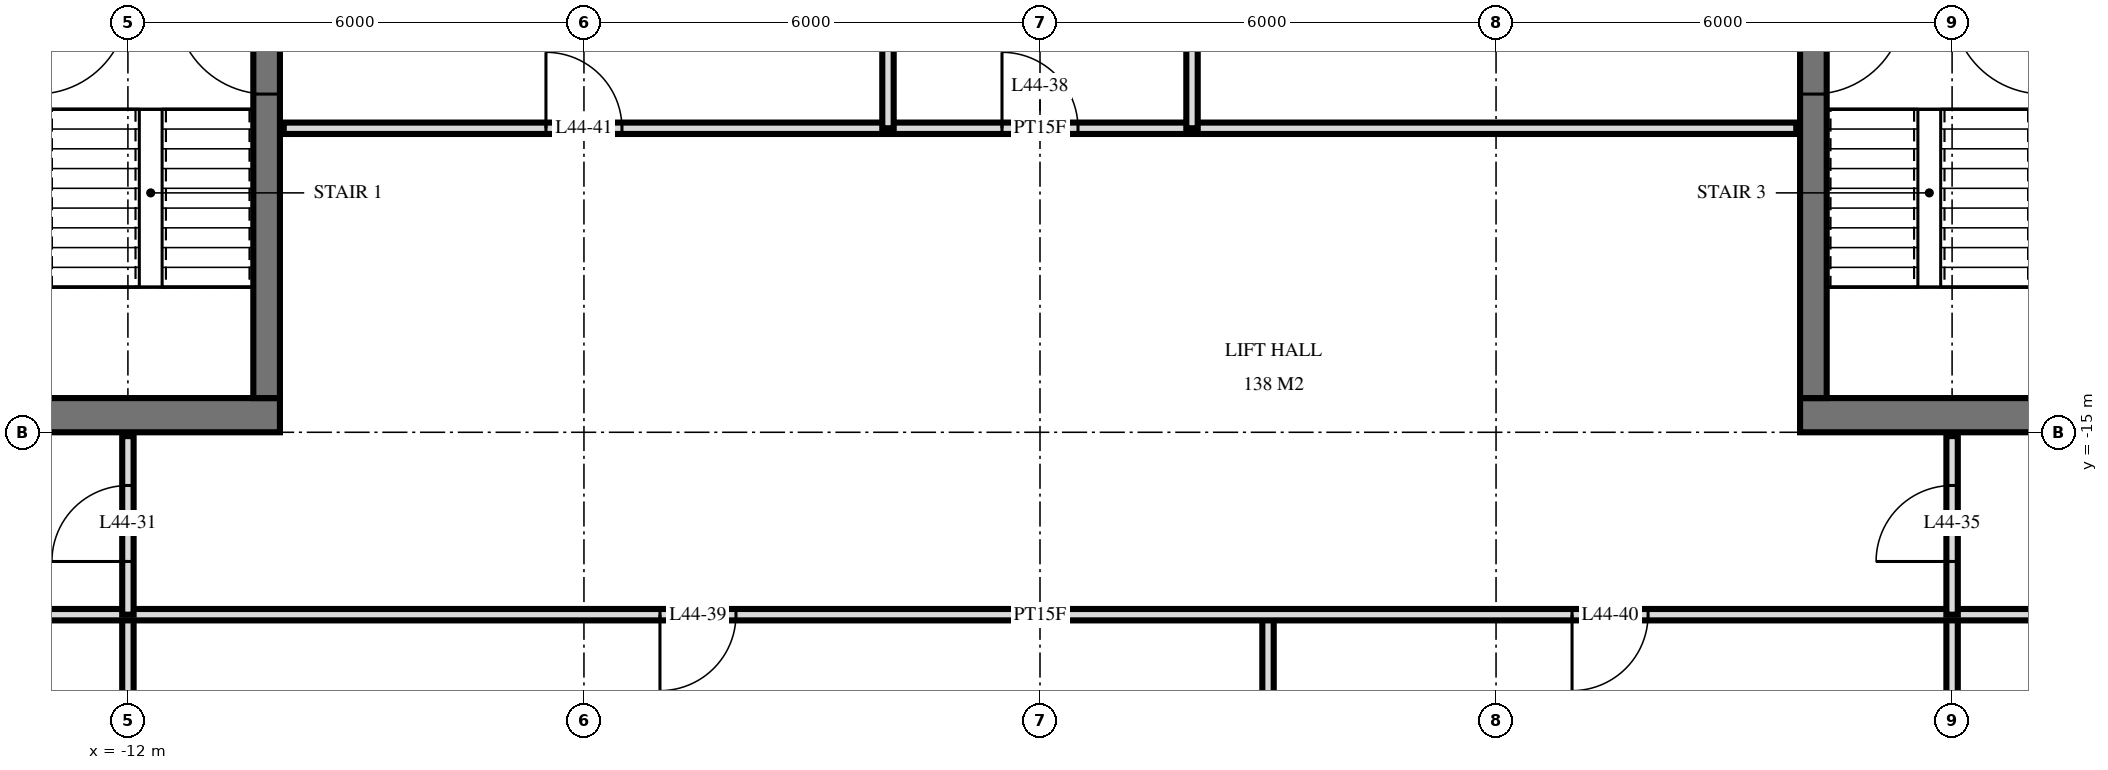
"""IFC4 building model, lengths in metres.
Left out: names, types, materials, properties, quantities, classifications, styles, units other than length and angle.
Written with IfcOpenShell. Run it as: python <this file> out.ifc"""

import sys

from ifc_helpers import new_model, si_unit, direction, frame, frame_2d, origin, place, context, subcontext, project, spatial, rectangle, extrude, element, fill, save


model = new_model("IFC4")
c1 = context("Model", 3, precision=1e-05, world=origin(), true_north=direction((0.0, 1.0)))
c2 = subcontext(c1, "Body", "Model", "MODEL_VIEW")
j1 = project(units=[si_unit("LENGTHUNIT", "METRE"), si_unit("PLANEANGLEUNIT", "RADIAN")], contexts=[c1])
p1 = place(None, origin())
s1 = spatial("IfcSite", under=j1, at=p1, CompositionType="ELEMENT")
p2 = place(p1, origin())
s2 = spatial("IfcBuilding", under=s1, at=p2, CompositionType="ELEMENT")
p3 = place(p2, frame((0.0, 0.0, 170.4)))
s3 = spatial("IfcBuildingStorey", under=s2, at=p3, CompositionType="ELEMENT", Elevation=170.4)
p4 = place(p3, frame((-24.5, -14.775, 0.0), z_axis=(0.0, 0.0, 1.0), x_axis=(1.0, 0.0, 0.0)))
e1 = element("IfcWall", 1, at=p4, inside=s3, PredefinedType="SHEAR", context=c2, shape_type="SweptSolid", body=[
    extrude(rectangle(XDim=14.5, YDim=0.45, at=frame_2d((7.25, 0.0))), origin(), (0.0, 0.0, 1.0), 3.6),
])
p5 = place(p4, frame((6.2, 0.0, 0.0)))
e2 = element("IfcOpeningElement", 2, at=p5, cuts=e1, PredefinedType="OPENING", context=c2, shape_type="SweptSolid", body=[
    extrude(rectangle(XDim=1.2, YDim=2.1, at=frame_2d((0.6, 1.05))), frame((0.0, 0.235, 0.0), z_axis=(0.0, -1.0, 0.0), x_axis=(1.0, 0.0, 0.0)), (0.0, 0.0, 1.0), 0.47),
])
p6 = place(p4, frame((9.25, 0.0, 0.0)))
e3 = element("IfcOpeningElement", 3, at=p6, cuts=e1, PredefinedType="OPENING", context=c2, shape_type="SweptSolid", body=[
    extrude(rectangle(XDim=1.1, YDim=2.1, at=frame_2d((0.55, 1.05))), frame((0.0, 0.235, 0.0), z_axis=(0.0, -1.0, 0.0), x_axis=(1.0, 0.0, 0.0)), (0.0, 0.0, 1.0), 0.47),
])
p7 = place(p4, frame((3.5, 0.0, 0.0)))
e4 = element("IfcOpeningElement", 4, at=p7, cuts=e1, PredefinedType="OPENING", context=c2, shape_type="SweptSolid", body=[
    extrude(rectangle(XDim=0.9, YDim=2.1, at=frame_2d((0.45, 1.05))), frame((0.0, 0.235, 0.0), z_axis=(0.0, -1.0, 0.0), x_axis=(1.0, 0.0, 0.0)), (0.0, 0.0, 1.0), 0.47),
])
p8 = place(p4, frame((1.05, 0.0, 0.0)))
e5 = element("IfcOpeningElement", 5, at=p8, cuts=e1, PredefinedType="OPENING", context=c2, shape_type="SweptSolid", body=[
    extrude(rectangle(XDim=1.0, YDim=2.1, at=frame_2d((0.5, 1.05))), frame((0.0, 0.235, 0.0), z_axis=(0.0, -1.0, 0.0), x_axis=(1.0, 0.0, 0.0)), (0.0, 0.0, 1.0), 0.47),
])
p9 = place(p3, frame((-10.175, -14.55, 0.0), z_axis=(0.0, 0.0, 1.0), x_axis=(0.0, 1.0, 0.0)))
e6 = element("IfcWall", 6, at=p9, inside=s3, PredefinedType="SHEAR", context=c2, shape_type="SweptSolid", body=[
    extrude(rectangle(XDim=14.1, YDim=0.35, at=frame_2d((7.05, 0.0))), origin(), (0.0, 0.0, 1.0), 3.6),
])
p10 = place(p9, frame((8.4, 0.0, 0.0)))
e7 = element("IfcOpeningElement", 7, at=p10, cuts=e6, PredefinedType="OPENING", context=c2, shape_type="SweptSolid", body=[
    extrude(rectangle(XDim=1.4, YDim=2.4, at=frame_2d((0.7, 1.2))), frame((0.0, 0.185, 0.0), z_axis=(0.0, -1.0, 0.0), x_axis=(1.0, 0.0, 0.0)), (0.0, 0.0, 1.0), 0.37),
])
p11 = place(p9, frame((10.0, 0.0, 0.0)))
e8 = element("IfcOpeningElement", 8, at=p11, cuts=e6, PredefinedType="OPENING", context=c2, shape_type="SweptSolid", body=[
    extrude(rectangle(XDim=1.4, YDim=2.4, at=frame_2d((0.7, 1.2))), frame((0.0, 0.185, 0.0), z_axis=(0.0, -1.0, 0.0), x_axis=(1.0, 0.0, 0.0)), (0.0, 0.0, 1.0), 0.37),
])
p12 = place(p9, frame((4.0, 0.0, 0.0)))
e9 = element("IfcOpeningElement", 9, at=p12, cuts=e6, PredefinedType="OPENING", context=c2, shape_type="SweptSolid", body=[
    extrude(rectangle(XDim=1.2, YDim=2.1, at=frame_2d((0.6, 1.05))), frame((0.0, 0.185, 0.0), z_axis=(0.0, -1.0, 0.0), x_axis=(1.0, 0.0, 0.0)), (0.0, 0.0, 1.0), 0.37),
])
p13 = place(p3, frame((10.0, -14.775, 0.0), z_axis=(0.0, 0.0, 1.0), x_axis=(1.0, 0.0, 0.0)))
e10 = element("IfcWall", 10, at=p13, inside=s3, PredefinedType="SHEAR", context=c2, shape_type="SweptSolid", body=[
    extrude(rectangle(XDim=14.5, YDim=0.45, at=frame_2d((7.25, 0.0))), origin(), (0.0, 0.0, 1.0), 3.6),
])
p14 = place(p13, frame((7.1, 0.0, 0.0)))
e11 = element("IfcOpeningElement", 11, at=p14, cuts=e10, PredefinedType="OPENING", context=c2, shape_type="SweptSolid", body=[
    extrude(rectangle(XDim=1.2, YDim=2.1, at=frame_2d((0.6, 1.05))), frame((0.0, 0.235, 0.0), z_axis=(0.0, -1.0, 0.0), x_axis=(1.0, 0.0, 0.0)), (0.0, 0.0, 1.0), 0.47),
])
p15 = place(p13, frame((4.15, 0.0, 0.0)))
e12 = element("IfcOpeningElement", 12, at=p15, cuts=e10, PredefinedType="OPENING", context=c2, shape_type="SweptSolid", body=[
    extrude(rectangle(XDim=1.1, YDim=2.1, at=frame_2d((0.55, 1.05))), frame((0.0, 0.235, 0.0), z_axis=(0.0, -1.0, 0.0), x_axis=(1.0, 0.0, 0.0)), (0.0, 0.0, 1.0), 0.47),
])
p16 = place(p13, frame((10.1, 0.0, 0.0)))
e13 = element("IfcOpeningElement", 13, at=p16, cuts=e10, PredefinedType="OPENING", context=c2, shape_type="SweptSolid", body=[
    extrude(rectangle(XDim=0.9, YDim=2.1, at=frame_2d((0.45, 1.05))), frame((0.0, 0.235, 0.0), z_axis=(0.0, -1.0, 0.0), x_axis=(1.0, 0.0, 0.0)), (0.0, 0.0, 1.0), 0.47),
])
p17 = place(p13, frame((12.45, 0.0, 0.0)))
e14 = element("IfcOpeningElement", 14, at=p17, cuts=e10, PredefinedType="OPENING", context=c2, shape_type="SweptSolid", body=[
    extrude(rectangle(XDim=1.0, YDim=2.1, at=frame_2d((0.5, 1.05))), frame((0.0, 0.235, 0.0), z_axis=(0.0, -1.0, 0.0), x_axis=(1.0, 0.0, 0.0)), (0.0, 0.0, 1.0), 0.47),
])
p18 = place(p3, frame((10.175, -14.55, 0.0), z_axis=(0.0, 0.0, 1.0), x_axis=(0.0, 1.0, 0.0)))
e15 = element("IfcWall", 15, at=p18, inside=s3, PredefinedType="SHEAR", context=c2, shape_type="SweptSolid", body=[
    extrude(rectangle(XDim=14.1, YDim=0.35, at=frame_2d((7.05, 0.0))), origin(), (0.0, 0.0, 1.0), 3.6),
])
p19 = place(p18, frame((8.4, 0.0, 0.0)))
e16 = element("IfcOpeningElement", 16, at=p19, cuts=e15, PredefinedType="OPENING", context=c2, shape_type="SweptSolid", body=[
    extrude(rectangle(XDim=1.4, YDim=2.4, at=frame_2d((0.7, 1.2))), frame((0.0, 0.185, 0.0), z_axis=(0.0, -1.0, 0.0), x_axis=(1.0, 0.0, 0.0)), (0.0, 0.0, 1.0), 0.37),
])
p20 = place(p18, frame((10.0, 0.0, 0.0)))
e17 = element("IfcOpeningElement", 17, at=p20, cuts=e15, PredefinedType="OPENING", context=c2, shape_type="SweptSolid", body=[
    extrude(rectangle(XDim=1.4, YDim=2.4, at=frame_2d((0.7, 1.2))), frame((0.0, 0.185, 0.0), z_axis=(0.0, -1.0, 0.0), x_axis=(1.0, 0.0, 0.0)), (0.0, 0.0, 1.0), 0.37),
])
p21 = place(p18, frame((4.0, 0.0, 0.0)))
e18 = element("IfcOpeningElement", 18, at=p21, cuts=e15, PredefinedType="OPENING", context=c2, shape_type="SweptSolid", body=[
    extrude(rectangle(XDim=1.2, YDim=2.1, at=frame_2d((0.6, 1.05))), frame((0.0, 0.185, 0.0), z_axis=(0.0, -1.0, 0.0), x_axis=(1.0, 0.0, 0.0)), (0.0, 0.0, 1.0), 0.37),
])
p22 = place(p3, frame((12.0, -17.4, 0.0), z_axis=(0.0, 0.0, 1.0), x_axis=(0.0, 1.0, 0.0)))
e19 = element("IfcWall", 19, at=p22, inside=s3, PredefinedType="PARTITIONING", context=c2, shape_type="SweptSolid", body=[
    extrude(rectangle(XDim=2.35, YDim=0.15, at=frame_2d((1.175, 0.0))), origin(), (0.0, 0.0, 1.0), 3.32),
])
p23 = place(p22, frame((0.7, 0.0, 0.0)))
e20 = element("IfcOpeningElement", 20, at=p23, cuts=e19, PredefinedType="OPENING", context=c2, shape_type="SweptSolid", body=[
    extrude(rectangle(XDim=1.0, YDim=2.1, at=frame_2d((0.5, 1.05))), frame((0.0, 0.085, 0.0), z_axis=(0.0, -1.0, 0.0), x_axis=(1.0, 0.0, 0.0)), (0.0, 0.0, 1.0), 0.17),
])
for number, where, z_axis, x_axis in (
    (21, (12.0, -33.62, 0.0), (0.0, 0.0, 1.0), (0.0, 1.0, 0.0)),
    (22, (3.0, -33.62, 0.0), (0.0, 0.0, 1.0), (0.0, 1.0, 0.0)),
):
    element("IfcWall", number, at=place(p3, frame(where, z_axis=z_axis, x_axis=x_axis)), inside=s3, PredefinedType="PARTITIONING", context=c2, shape_type="SweptSolid", body=[
        extrude(rectangle(XDim=16.22, YDim=0.15, at=frame_2d((8.11, 0.0))), origin(), (0.0, 0.0, 1.0), 3.32),
    ])
for number, where, z_axis, x_axis in (
    (23, (2.0, -11.0, 0.0), (0.0, 0.0, 1.0), (0.0, 1.0, 0.0)),
    (24, (-2.0, -11.0, 0.0), (0.0, 0.0, 1.0), (0.0, 1.0, 0.0)),
):
    element("IfcWall", number, at=place(p3, frame(where, z_axis=z_axis, x_axis=x_axis)), inside=s3, PredefinedType="PARTITIONING", context=c2, shape_type="SweptSolid", body=[
        extrude(rectangle(XDim=4.0, YDim=0.15, at=frame_2d((2.0, 0.0))), origin(), (0.0, 0.0, 1.0), 3.32),
    ])
p24 = place(p3, frame((-12.0, -17.4, 0.0), z_axis=(0.0, 0.0, 1.0), x_axis=(0.0, 1.0, 0.0)))
e25 = element("IfcWall", 25, at=p24, inside=s3, PredefinedType="PARTITIONING", context=c2, shape_type="SweptSolid", body=[
    extrude(rectangle(XDim=2.35, YDim=0.15, at=frame_2d((1.175, 0.0))), origin(), (0.0, 0.0, 1.0), 3.32),
])
p25 = place(p24, frame((0.7, 0.0, 0.0)))
e26 = element("IfcOpeningElement", 26, at=p25, cuts=e25, PredefinedType="OPENING", context=c2, shape_type="SweptSolid", body=[
    extrude(rectangle(XDim=1.0, YDim=2.1, at=frame_2d((0.5, 1.05))), frame((0.0, 0.085, 0.0), z_axis=(0.0, -1.0, 0.0), x_axis=(1.0, 0.0, 0.0)), (0.0, 0.0, 1.0), 0.17),
])
p26 = place(p3, frame((-12.0, -33.62, 0.0), z_axis=(0.0, 0.0, 1.0), x_axis=(0.0, 1.0, 0.0)))
e27 = element("IfcWall", 27, at=p26, inside=s3, PredefinedType="PARTITIONING", context=c2, shape_type="SweptSolid", body=[
    extrude(rectangle(XDim=16.22, YDim=0.15, at=frame_2d((8.11, 0.0))), origin(), (0.0, 0.0, 1.0), 3.32),
])
p27 = place(p3, frame((-28.02, -17.4, 0.0), z_axis=(0.0, 0.0, 1.0), x_axis=(1.0, 0.0, 0.0)))
e28 = element("IfcWall", 28, at=p27, inside=s3, PredefinedType="PARTITIONING", context=c2, shape_type="SweptSolid", body=[
    extrude(rectangle(XDim=56.04, YDim=0.15, at=frame_2d((28.02, 0.0))), origin(), (0.0, 0.0, 1.0), 3.32),
])
p28 = place(p27, frame((10.42, 0.0, 0.0)))
e29 = element("IfcOpeningElement", 29, at=p28, cuts=e28, PredefinedType="OPENING", context=c2, shape_type="SweptSolid", body=[
    extrude(rectangle(XDim=1.0, YDim=2.1, at=frame_2d((0.5, 1.05))), frame((0.0, 0.085, 0.0), z_axis=(0.0, -1.0, 0.0), x_axis=(1.0, 0.0, 0.0)), (0.0, 0.0, 1.0), 0.17),
])
p29 = place(p27, frame((2.32, 0.0, 0.0)))
e30 = element("IfcOpeningElement", 30, at=p29, cuts=e28, PredefinedType="OPENING", context=c2, shape_type="SweptSolid", body=[
    extrude(rectangle(XDim=1.0, YDim=2.1, at=frame_2d((0.5, 1.05))), frame((0.0, 0.085, 0.0), z_axis=(0.0, -1.0, 0.0), x_axis=(1.0, 0.0, 0.0)), (0.0, 0.0, 1.0), 0.17),
])
p30 = place(p27, frame((49.72, 0.0, 0.0)))
e31 = element("IfcOpeningElement", 31, at=p30, cuts=e28, PredefinedType="OPENING", context=c2, shape_type="SweptSolid", body=[
    extrude(rectangle(XDim=1.0, YDim=2.1, at=frame_2d((0.5, 1.05))), frame((0.0, 0.085, 0.0), z_axis=(0.0, -1.0, 0.0), x_axis=(1.0, 0.0, 0.0)), (0.0, 0.0, 1.0), 0.17),
])
p31 = place(p27, frame((23.02, 0.0, 0.0)))
e32 = element("IfcOpeningElement", 32, at=p31, cuts=e28, PredefinedType="OPENING", context=c2, shape_type="SweptSolid", body=[
    extrude(rectangle(XDim=1.0, YDim=2.1, at=frame_2d((0.5, 1.05))), frame((0.0, 0.085, 0.0), z_axis=(0.0, -1.0, 0.0), x_axis=(1.0, 0.0, 0.0)), (0.0, 0.0, 1.0), 0.17),
])
p32 = place(p27, frame((35.02, 0.0, 0.0)))
e33 = element("IfcOpeningElement", 33, at=p32, cuts=e28, PredefinedType="OPENING", context=c2, shape_type="SweptSolid", body=[
    extrude(rectangle(XDim=1.0, YDim=2.1, at=frame_2d((0.5, 1.05))), frame((0.0, 0.085, 0.0), z_axis=(0.0, -1.0, 0.0), x_axis=(1.0, 0.0, 0.0)), (0.0, 0.0, 1.0), 0.17),
])
p33 = place(p3, frame((-9.95, -11.0, 0.0), z_axis=(0.0, 0.0, 1.0), x_axis=(1.0, 0.0, 0.0)))
e34 = element("IfcWall", 34, at=p33, inside=s3, PredefinedType="PARTITIONING", context=c2, shape_type="SweptSolid", body=[
    extrude(rectangle(XDim=19.9, YDim=0.15, at=frame_2d((9.95, 0.0))), origin(), (0.0, 0.0, 1.0), 3.32),
])
p34 = place(p33, frame((9.45, 0.0, 0.0)))
e35 = element("IfcOpeningElement", 35, at=p34, cuts=e34, PredefinedType="OPENING", context=c2, shape_type="SweptSolid", body=[
    extrude(rectangle(XDim=1.0, YDim=2.1, at=frame_2d((0.5, 1.05))), frame((0.0, 0.085, 0.0), z_axis=(0.0, -1.0, 0.0), x_axis=(1.0, 0.0, 0.0)), (0.0, 0.0, 1.0), 0.17),
])
p35 = place(p33, frame((3.45, 0.0, 0.0)))
e36 = element("IfcOpeningElement", 36, at=p35, cuts=e34, PredefinedType="OPENING", context=c2, shape_type="SweptSolid", body=[
    extrude(rectangle(XDim=1.0, YDim=2.1, at=frame_2d((0.5, 1.05))), frame((0.0, 0.085, 0.0), z_axis=(0.0, -1.0, 0.0), x_axis=(1.0, 0.0, 0.0)), (0.0, 0.0, 1.0), 0.17),
])
p36 = place(p12, origin())
e37 = element("IfcDoor", 37, at=p36, inside=s3, OperationType="SINGLE_SWING_LEFT", PredefinedType="DOOR", context=c2, shape_type="SweptSolid", body=[
    extrude(rectangle(XDim=1.2, YDim=2.1, at=frame_2d((0.6, 1.05))), frame((0.0, 0.025, 0.0), z_axis=(0.0, -1.0, 0.0), x_axis=(1.0, 0.0, 0.0)), (0.0, 0.0, 1.0), 0.05),
])
fill(e9, e37)
p37 = place(p21, frame((0.6, 0.0, 0.0), z_axis=(0.0, 0.0, 1.0), x_axis=(-1.0, 0.0, 0.0)))
e38 = element("IfcDoor", 38, at=p37, inside=s3, OperationType="SINGLE_SWING_RIGHT", PredefinedType="DOOR", context=c2, shape_type="SweptSolid", body=[
    extrude(rectangle(XDim=1.2, YDim=2.1, at=frame_2d((0.0, 1.05))), frame((0.0, -0.025, 0.0), z_axis=(0.0, 1.0, 0.0), x_axis=(-1.0, 0.0, 0.0)), (0.0, 0.0, 1.0), 0.05),
])
fill(e18, e38)
p38 = place(p25, origin())
e39 = element("IfcDoor", 39, at=p38, inside=s3, OperationType="SINGLE_SWING_RIGHT", PredefinedType="DOOR", context=c2, shape_type="SweptSolid", body=[
    extrude(rectangle(XDim=1.0, YDim=2.1, at=frame_2d((0.5, 1.05))), frame((0.0, 0.025, 0.0), z_axis=(0.0, -1.0, 0.0), x_axis=(1.0, 0.0, 0.0)), (0.0, 0.0, 1.0), 0.05),
])
fill(e26, e39)
p39 = place(p23, origin())
e40 = element("IfcDoor", 40, at=p39, inside=s3, OperationType="SINGLE_SWING_RIGHT", PredefinedType="DOOR", context=c2, shape_type="SweptSolid", body=[
    extrude(rectangle(XDim=1.0, YDim=2.1, at=frame_2d((0.5, 1.05))), frame((0.0, 0.025, 0.0), z_axis=(0.0, -1.0, 0.0), x_axis=(1.0, 0.0, 0.0)), (0.0, 0.0, 1.0), 0.05),
])
fill(e20, e40)
p40 = place(p34, origin())
e41 = element("IfcDoor", 41, at=p40, inside=s3, OperationType="SINGLE_SWING_RIGHT", PredefinedType="DOOR", context=c2, shape_type="SweptSolid", body=[
    extrude(rectangle(XDim=1.0, YDim=2.1, at=frame_2d((0.5, 1.05))), frame((0.0, 0.025, 0.0), z_axis=(0.0, -1.0, 0.0), x_axis=(1.0, 0.0, 0.0)), (0.0, 0.0, 1.0), 0.05),
])
fill(e35, e41)
p41 = place(p31, frame((0.5, 0.0, 0.0), z_axis=(0.0, 0.0, 1.0), x_axis=(-1.0, 0.0, 0.0)))
e42 = element("IfcDoor", 42, at=p41, inside=s3, OperationType="SINGLE_SWING_LEFT", PredefinedType="DOOR", context=c2, shape_type="SweptSolid", body=[
    extrude(rectangle(XDim=1.0, YDim=2.1, at=frame_2d((0.0, 1.05))), frame((0.0, -0.025, 0.0), z_axis=(0.0, 1.0, 0.0), x_axis=(-1.0, 0.0, 0.0)), (0.0, 0.0, 1.0), 0.05),
])
fill(e32, e42)
p42 = place(p32, frame((0.5, 0.0, 0.0), z_axis=(0.0, 0.0, 1.0), x_axis=(-1.0, 0.0, 0.0)))
e43 = element("IfcDoor", 43, at=p42, inside=s3, OperationType="SINGLE_SWING_LEFT", PredefinedType="DOOR", context=c2, shape_type="SweptSolid", body=[
    extrude(rectangle(XDim=1.0, YDim=2.1, at=frame_2d((0.0, 1.05))), frame((0.0, -0.025, 0.0), z_axis=(0.0, 1.0, 0.0), x_axis=(-1.0, 0.0, 0.0)), (0.0, 0.0, 1.0), 0.05),
])
fill(e33, e43)
p43 = place(p35, origin())
e44 = element("IfcDoor", 44, at=p43, inside=s3, OperationType="SINGLE_SWING_RIGHT", PredefinedType="DOOR", context=c2, shape_type="SweptSolid", body=[
    extrude(rectangle(XDim=1.0, YDim=2.1, at=frame_2d((0.5, 1.05))), frame((0.0, 0.025, 0.0), z_axis=(0.0, -1.0, 0.0), x_axis=(1.0, 0.0, 0.0)), (0.0, 0.0, 1.0), 0.05),
])
fill(e36, e44)
save(model, sys.argv[1])
